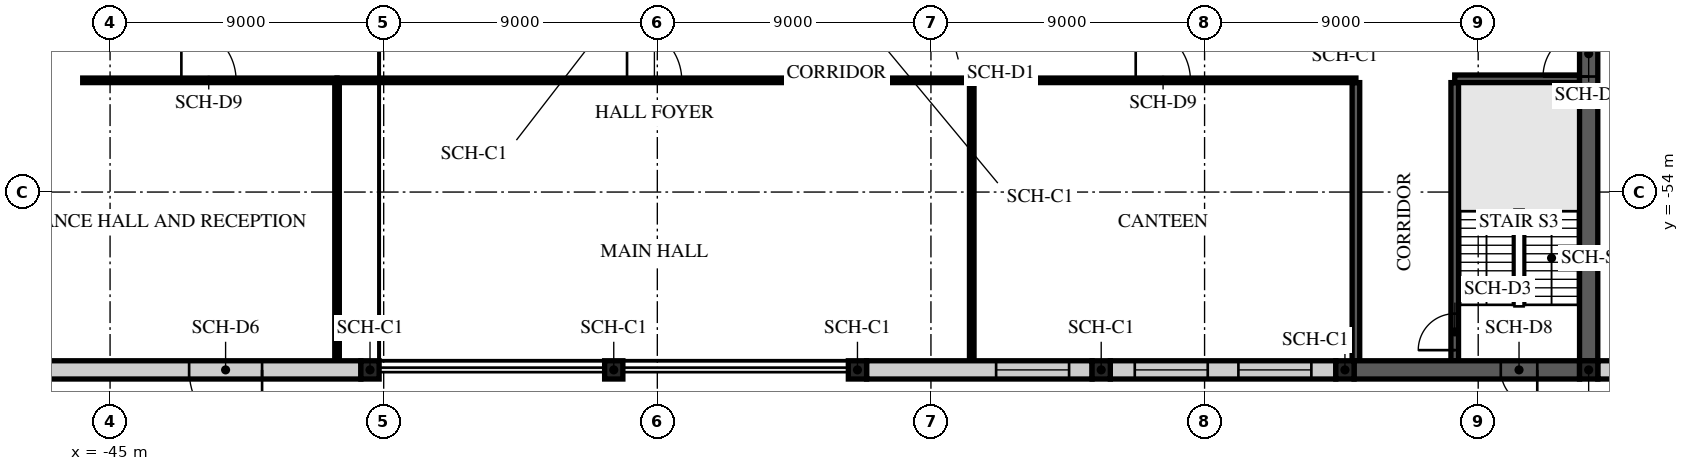
"""IFC4 building model, lengths in metres.
Left out: names, types, materials, properties, quantities, classifications, styles, units other than length and angle.
Written with IfcOpenShell. Run it as: python <this file> out.ifc"""

import sys

from ifc_helpers import new_model, si_unit, direction, frame, frame_2d, origin, origin_2d, place, context, subcontext, project, spatial, rectangle, extrude, element, fill, save


model = new_model("IFC4")
c1 = context("Model", 3, precision=1e-05, world=origin(), true_north=direction((0.0, 1.0)))
c2 = subcontext(c1, "Body", "Model", "MODEL_VIEW")
j1 = project(units=[si_unit("LENGTHUNIT", "METRE"), si_unit("PLANEANGLEUNIT", "RADIAN")], contexts=[c1])
p1 = place(None, origin())
s1 = spatial("IfcSite", under=j1, at=p1, CompositionType="ELEMENT")
p2 = place(p1, origin())
s2 = spatial("IfcBuilding", under=s1, at=p2, CompositionType="ELEMENT")
p3 = place(p2, origin())
s3 = spatial("IfcBuildingStorey", under=s2, at=p3, CompositionType="ELEMENT", Elevation=0.0)
for number, where, z_axis, x_axis in (
    (1, (-36.45, -59.85, -0.2), (0.0, 0.0, 1.0), (1.0, 0.0, 0.0)),
    (2, (-28.433, -59.85, -0.2), (0.0, 0.0, 1.0), (1.0, 0.0, 0.0)),
    (3, (-20.417, -59.85, -0.2), (0.0, 0.0, 1.0), (1.0, 0.0, 0.0)),
    (4, (-12.4, -59.85, -0.2), (0.0, 0.0, 1.0), (1.0, 0.0, 0.0)),
    (5, (-4.383, -59.85, -0.2), (0.0, 0.0, 1.0), (1.0, 0.0, 0.0)),
    (6, (3.633, -59.85, -0.2), (0.0, 0.0, 1.0), (1.0, 0.0, 0.0)),
):
    element("IfcColumn", number, at=place(p3, frame(where, z_axis=z_axis, x_axis=x_axis)), inside=s3, PredefinedType="COLUMN", context=c2, shape_type="SweptSolid", body=[
        extrude(rectangle(XDim=0.6, YDim=0.6, at=origin_2d()), origin(), (0.0, 0.0, 1.0), 4.7),
    ])
for number, where, z_axis, x_axis in (
    (7, (-37.534, -59.55, 0.0), (0.0, 0.0, 1.0), (0.0, 1.0, 0.0)),
    (8, (-16.658, -59.55, 0.0), (0.0, 0.0, 1.0), (0.0, 1.0, 0.0)),
):
    element("IfcWall", number, at=place(p3, frame(where, z_axis=z_axis, x_axis=x_axis)), inside=s3, PredefinedType="PARTITIONING", context=c2, shape_type="SweptSolid", body=[
        extrude(rectangle(XDim=9.15, YDim=0.15, at=frame_2d((4.575, 0.0))), origin(), (0.0, 0.0, 1.0), 4.1),
    ])
p4 = place(p3, frame((-4.022, -59.55, 0.0), z_axis=(0.0, 0.0, 1.0), x_axis=(0.0, 1.0, 0.0)))
e9 = element("IfcWall", 9, at=p4, inside=s3, PredefinedType="SHEAR", context=c2, shape_type="SweptSolid", body=[
    extrude(rectangle(XDim=9.15, YDim=0.25, at=frame_2d((4.575, 0.0))), origin(), (0.0, 0.0, 1.0), 4.1),
])
p5 = place(p3, frame((-0.772, -59.55, 0.0), z_axis=(0.0, 0.0, 1.0), x_axis=(0.0, 1.0, 0.0)))
e10 = element("IfcWall", 10, at=p5, inside=s3, PredefinedType="SHEAR", context=c2, shape_type="SweptSolid", body=[
    extrude(rectangle(XDim=9.15, YDim=0.25, at=frame_2d((4.575, 0.0))), origin(), (0.0, 0.0, 1.0), 4.1),
])
p6 = place(p5, frame((0.35, 0.0, 0.0)))
e11 = element("IfcOpeningElement", 11, at=p6, cuts=e10, PredefinedType="OPENING", context=c2, shape_type="SweptSolid", body=[
    extrude(rectangle(XDim=1.2, YDim=2.1, at=frame_2d((0.6, 1.05))), frame((0.0, 0.135, 0.0), z_axis=(0.0, -1.0, 0.0), x_axis=(1.0, 0.0, 0.0)), (0.0, 0.0, 1.0), 0.27),
])
p7 = place(p3, frame((-45.9, -50.325, 0.0), z_axis=(0.0, 0.0, 1.0), x_axis=(1.0, 0.0, 0.0)))
e12 = element("IfcWall", 12, at=p7, inside=s3, PredefinedType="PARTITIONING", context=c2, shape_type="SweptSolid", body=[
    extrude(rectangle(XDim=8.365, YDim=0.15, at=frame_2d((4.183, 0.0))), origin(), (0.0, 0.0, 1.0), 4.1),
])
p8 = place(p7, frame((3.245, 0.0, 0.0)))
e13 = element("IfcOpeningElement", 13, at=p8, cuts=e12, PredefinedType="OPENING", context=c2, shape_type="SweptSolid", body=[
    extrude(rectangle(XDim=1.8, YDim=2.4, at=frame_2d((0.9, 1.2))), frame((0.0, 0.085, 0.0), z_axis=(0.0, -1.0, 0.0), x_axis=(1.0, 0.0, 0.0)), (0.0, 0.0, 1.0), 0.17),
])
p9 = place(p3, frame((-37.534, -50.325, 0.0), z_axis=(0.0, 0.0, 1.0), x_axis=(1.0, 0.0, 0.0)))
e14 = element("IfcWall", 14, at=p9, inside=s3, PredefinedType="PARTITIONING", context=c2, shape_type="SweptSolid", body=[
    extrude(rectangle(XDim=20.876, YDim=0.15, at=frame_2d((10.438, 0.0))), origin(), (0.0, 0.0, 1.0), 4.1),
])
p10 = place(p9, frame((9.538, 0.0, 0.0)))
e15 = element("IfcOpeningElement", 15, at=p10, cuts=e14, PredefinedType="OPENING", context=c2, shape_type="SweptSolid", body=[
    extrude(rectangle(XDim=1.8, YDim=2.4, at=frame_2d((0.9, 1.2))), frame((0.0, 0.085, 0.0), z_axis=(0.0, -1.0, 0.0), x_axis=(1.0, 0.0, 0.0)), (0.0, 0.0, 1.0), 0.17),
])
p11 = place(p3, frame((-16.658, -50.325, 0.0), z_axis=(0.0, 0.0, 1.0), x_axis=(1.0, 0.0, 0.0)))
e16 = element("IfcWall", 16, at=p11, inside=s3, PredefinedType="PARTITIONING", context=c2, shape_type="SweptSolid", body=[
    extrude(rectangle(XDim=12.636, YDim=0.15, at=frame_2d((6.318, 0.0))), origin(), (0.0, 0.0, 1.0), 4.1),
])
p12 = place(p11, frame((5.393, 0.0, 0.0)))
e17 = element("IfcOpeningElement", 17, at=p12, cuts=e16, PredefinedType="OPENING", context=c2, shape_type="SweptSolid", body=[
    extrude(rectangle(XDim=1.8, YDim=2.4, at=frame_2d((0.9, 1.2))), frame((0.0, 0.085, 0.0), z_axis=(0.0, -1.0, 0.0), x_axis=(1.0, 0.0, 0.0)), (0.0, 0.0, 1.0), 0.17),
])
p13 = place(p3, frame((-0.772, -50.275, 0.0), z_axis=(0.0, 0.0, 1.0), x_axis=(1.0, 0.0, 0.0)))
e18 = element("IfcWall", 18, at=p13, inside=s3, PredefinedType="SHEAR", context=c2, shape_type="SweptSolid", body=[
    extrude(rectangle(XDim=4.105, YDim=0.25, at=frame_2d((2.052, 0.0))), origin(), (0.0, 0.0, 1.0), 4.1),
])
p14 = place(p3, frame((11.35, -59.85, -0.2), z_axis=(0.0, 0.0, 1.0), x_axis=(-1.0, 0.0, 0.0)))
e19 = element("IfcWall", 19, at=p14, inside=s3, PredefinedType="SOLIDWALL", context=c2, shape_type="SweptSolid", body=[
    extrude(rectangle(XDim=7.417, YDim=0.6, at=frame_2d((3.708, 0.0))), origin(), (0.0, 0.0, 1.0), 4.7),
])
p15 = place(p3, frame((3.333, -59.85, -0.2), z_axis=(0.0, 0.0, 1.0), x_axis=(-1.0, 0.0, 0.0)))
e20 = element("IfcWall", 20, at=p15, inside=s3, PredefinedType="STANDARD", context=c2, shape_type="SweptSolid", body=[
    extrude(rectangle(XDim=7.417, YDim=0.6, at=frame_2d((3.708, 0.0))), origin(), (0.0, 0.0, 1.0), 4.3),
])
p16 = place(p15, frame((1.39, 0.0, 0.2)))
e21 = element("IfcOpeningElement", 21, at=p16, cuts=e20, PredefinedType="OPENING", context=c2, shape_type="SweptSolid", body=[
    extrude(rectangle(XDim=1.2, YDim=2.1, at=frame_2d((0.6, 1.05))), frame((0.0, 0.31, 0.0), z_axis=(0.0, -1.0, 0.0), x_axis=(1.0, 0.0, 0.0)), (0.0, 0.0, 1.0), 0.62),
])
p17 = place(p3, frame((-4.683, -59.85, -0.2), z_axis=(0.0, 0.0, 1.0), x_axis=(-1.0, 0.0, 0.0)))
e22 = element("IfcWall", 22, at=p17, inside=s3, PredefinedType="STANDARD", context=c2, shape_type="SweptSolid", body=[
    extrude(rectangle(XDim=7.417, YDim=0.6, at=frame_2d((3.708, 0.0))), origin(), (0.0, 0.0, 1.0), 4.3),
])
p18 = place(p17, frame((0.804, 0.0, 1.1)))
e23 = element("IfcOpeningElement", 23, at=p18, cuts=e22, PredefinedType="OPENING", context=c2, shape_type="SweptSolid", body=[
    extrude(rectangle(XDim=2.4, YDim=2.1, at=frame_2d((1.2, 1.05))), frame((0.0, 0.31, 0.0), z_axis=(0.0, -1.0, 0.0), x_axis=(1.0, 0.0, 0.0)), (0.0, 0.0, 1.0), 0.62),
])
p19 = place(p17, frame((4.212, 0.0, 1.1)))
e24 = element("IfcOpeningElement", 24, at=p19, cuts=e22, PredefinedType="OPENING", context=c2, shape_type="SweptSolid", body=[
    extrude(rectangle(XDim=2.4, YDim=2.1, at=frame_2d((1.2, 1.05))), frame((0.0, 0.31, 0.0), z_axis=(0.0, -1.0, 0.0), x_axis=(1.0, 0.0, 0.0)), (0.0, 0.0, 1.0), 0.62),
])
p20 = place(p3, frame((-12.7, -59.85, -0.2), z_axis=(0.0, 0.0, 1.0), x_axis=(-1.0, 0.0, 0.0)))
e25 = element("IfcWall", 25, at=p20, inside=s3, PredefinedType="STANDARD", context=c2, shape_type="SweptSolid", body=[
    extrude(rectangle(XDim=7.417, YDim=0.6, at=frame_2d((3.708, 0.0))), origin(), (0.0, 0.0, 1.0), 4.3),
])
p21 = place(p20, frame((0.756, 0.0, 1.1)))
e26 = element("IfcOpeningElement", 26, at=p21, cuts=e25, PredefinedType="OPENING", context=c2, shape_type="SweptSolid", body=[
    extrude(rectangle(XDim=2.4, YDim=2.1, at=frame_2d((1.2, 1.05))), frame((0.0, 0.31, 0.0), z_axis=(0.0, -1.0, 0.0), x_axis=(1.0, 0.0, 0.0)), (0.0, 0.0, 1.0), 0.62),
])
p22 = place(p3, frame((-36.75, -59.85, -0.2), z_axis=(0.0, 0.0, 1.0), x_axis=(-1.0, 0.0, 0.0)))
e27 = element("IfcWall", 27, at=p22, inside=s3, PredefinedType="STANDARD", context=c2, shape_type="SweptSolid", body=[
    extrude(rectangle(XDim=11.1, YDim=0.6, at=frame_2d((5.55, 0.0))), origin(), (0.0, 0.0, 1.0), 4.3),
])
p23 = place(p22, frame((3.25, 0.0, 0.2)))
e28 = element("IfcOpeningElement", 28, at=p23, cuts=e27, PredefinedType="OPENING", context=c2, shape_type="SweptSolid", body=[
    extrude(rectangle(XDim=2.4, YDim=2.4, at=frame_2d((1.2, 1.2))), frame((0.0, 0.31, 0.0), z_axis=(0.0, -1.0, 0.0), x_axis=(1.0, 0.0, 0.0)), (0.0, 0.0, 1.0), 0.62),
])
p24 = place(p3, frame((3.633, -59.55, -0.2), z_axis=(0.0, 0.0, 1.0), x_axis=(0.0, 1.0, 0.0)))
e29 = element("IfcWall", 29, at=p24, inside=s3, PredefinedType="SOLIDWALL", context=c2, shape_type="SweptSolid", body=[
    extrude(rectangle(XDim=11.1, YDim=0.6, at=frame_2d((5.55, 0.0))), origin(), (0.0, 0.0, 1.0), 4.7),
])
p25 = place(p24, frame((9.35, 0.0, 0.2)))
e30 = element("IfcOpeningElement", 30, at=p25, cuts=e29, PredefinedType="OPENING", context=c2, shape_type="SweptSolid", body=[
    extrude(rectangle(XDim=1.5, YDim=2.4, at=frame_2d((0.75, 1.2))), frame((0.0, 0.31, 0.0), z_axis=(0.0, -1.0, 0.0), x_axis=(1.0, 0.0, 0.0)), (0.0, 0.0, 1.0), 0.62),
])
p26 = place(p8, origin())
e31 = element("IfcDoor", 31, at=p26, inside=s3, OperationType="DOUBLE_DOOR_SINGLE_SWING", PredefinedType="DOOR", context=c2, shape_type="SweptSolid", body=[
    extrude(rectangle(XDim=1.8, YDim=2.4, at=frame_2d((0.9, 1.2))), frame((0.0, 0.025, 0.0), z_axis=(0.0, -1.0, 0.0), x_axis=(1.0, 0.0, 0.0)), (0.0, 0.0, 1.0), 0.05),
])
fill(e13, e31)
p27 = place(p10, origin())
e32 = element("IfcDoor", 32, at=p27, inside=s3, OperationType="DOUBLE_DOOR_SINGLE_SWING", PredefinedType="DOOR", context=c2, shape_type="SweptSolid", body=[
    extrude(rectangle(XDim=1.8, YDim=2.4, at=frame_2d((0.9, 1.2))), frame((0.0, 0.025, 0.0), z_axis=(0.0, -1.0, 0.0), x_axis=(1.0, 0.0, 0.0)), (0.0, 0.0, 1.0), 0.05),
])
fill(e15, e32)
p28 = place(p12, origin())
e33 = element("IfcDoor", 33, at=p28, inside=s3, OperationType="DOUBLE_DOOR_SINGLE_SWING", PredefinedType="DOOR", context=c2, shape_type="SweptSolid", body=[
    extrude(rectangle(XDim=1.8, YDim=2.4, at=frame_2d((0.9, 1.2))), frame((0.0, 0.025, 0.0), z_axis=(0.0, -1.0, 0.0), x_axis=(1.0, 0.0, 0.0)), (0.0, 0.0, 1.0), 0.05),
])
fill(e17, e33)
p29 = place(p16, origin())
e34 = element("IfcDoor", 34, at=p29, inside=s3, OperationType="SINGLE_SWING_LEFT", PredefinedType="DOOR", context=c2, shape_type="SweptSolid", body=[
    extrude(rectangle(XDim=1.2, YDim=2.1, at=frame_2d((0.6, 1.05))), frame((0.0, 0.025, 0.0), z_axis=(0.0, -1.0, 0.0), x_axis=(1.0, 0.0, 0.0)), (0.0, 0.0, 1.0), 0.05),
])
fill(e21, e34)
p30 = place(p23, origin())
e35 = element("IfcDoor", 35, at=p30, inside=s3, OperationType="DOUBLE_DOOR_SINGLE_SWING", PredefinedType="DOOR", context=c2, shape_type="SweptSolid", body=[
    extrude(rectangle(XDim=2.4, YDim=2.4, at=frame_2d((1.2, 1.2))), frame((0.0, 0.025, 0.0), z_axis=(0.0, -1.0, 0.0), x_axis=(1.0, 0.0, 0.0)), (0.0, 0.0, 1.0), 0.05),
])
fill(e28, e35)
p31 = place(p18, origin())
e36 = element("IfcWindow", 36, at=p31, inside=s3, PartitioningType="SINGLE_PANEL", PredefinedType="WINDOW", context=c2, shape_type="SweptSolid", body=[
    extrude(rectangle(XDim=2.4, YDim=2.1, at=frame_2d((1.2, 1.05))), frame((0.0, 0.03, 0.0), z_axis=(0.0, -1.0, 0.0), x_axis=(1.0, 0.0, 0.0)), (0.0, 0.0, 1.0), 0.06),
])
fill(e23, e36)
p32 = place(p19, origin())
e37 = element("IfcWindow", 37, at=p32, inside=s3, PartitioningType="SINGLE_PANEL", PredefinedType="WINDOW", context=c2, shape_type="SweptSolid", body=[
    extrude(rectangle(XDim=2.4, YDim=2.1, at=frame_2d((1.2, 1.05))), frame((0.0, 0.03, 0.0), z_axis=(0.0, -1.0, 0.0), x_axis=(1.0, 0.0, 0.0)), (0.0, 0.0, 1.0), 0.06),
])
fill(e24, e37)
p33 = place(p21, origin())
e38 = element("IfcWindow", 38, at=p33, inside=s3, PartitioningType="SINGLE_PANEL", PredefinedType="WINDOW", context=c2, shape_type="SweptSolid", body=[
    extrude(rectangle(XDim=2.4, YDim=2.1, at=frame_2d((1.2, 1.05))), frame((0.0, 0.03, 0.0), z_axis=(0.0, -1.0, 0.0), x_axis=(1.0, 0.0, 0.0)), (0.0, 0.0, 1.0), 0.06),
])
fill(e26, e38)
p34 = place(p25, origin())
e39 = element("IfcDoor", 39, at=p34, inside=s3, OperationType="DOUBLE_DOOR_SINGLE_SWING", PredefinedType="DOOR", context=c2, shape_type="SweptSolid", body=[
    extrude(rectangle(XDim=1.5, YDim=2.4, at=frame_2d((0.75, 1.2))), frame((0.0, 0.025, 0.0), z_axis=(0.0, -1.0, 0.0), x_axis=(1.0, 0.0, 0.0)), (0.0, 0.0, 1.0), 0.05),
])
fill(e30, e39)
p35 = place(p6, origin())
e40 = element("IfcDoor", 40, at=p35, inside=s3, OperationType="SINGLE_SWING_RIGHT", PredefinedType="DOOR", context=c2, shape_type="SweptSolid", body=[
    extrude(rectangle(XDim=1.2, YDim=2.1, at=frame_2d((0.6, 1.05))), frame((0.0, 0.025, 0.0), z_axis=(0.0, -1.0, 0.0), x_axis=(1.0, 0.0, 0.0)), (0.0, 0.0, 1.0), 0.05),
])
fill(e11, e40)
save(model, sys.argv[1])
